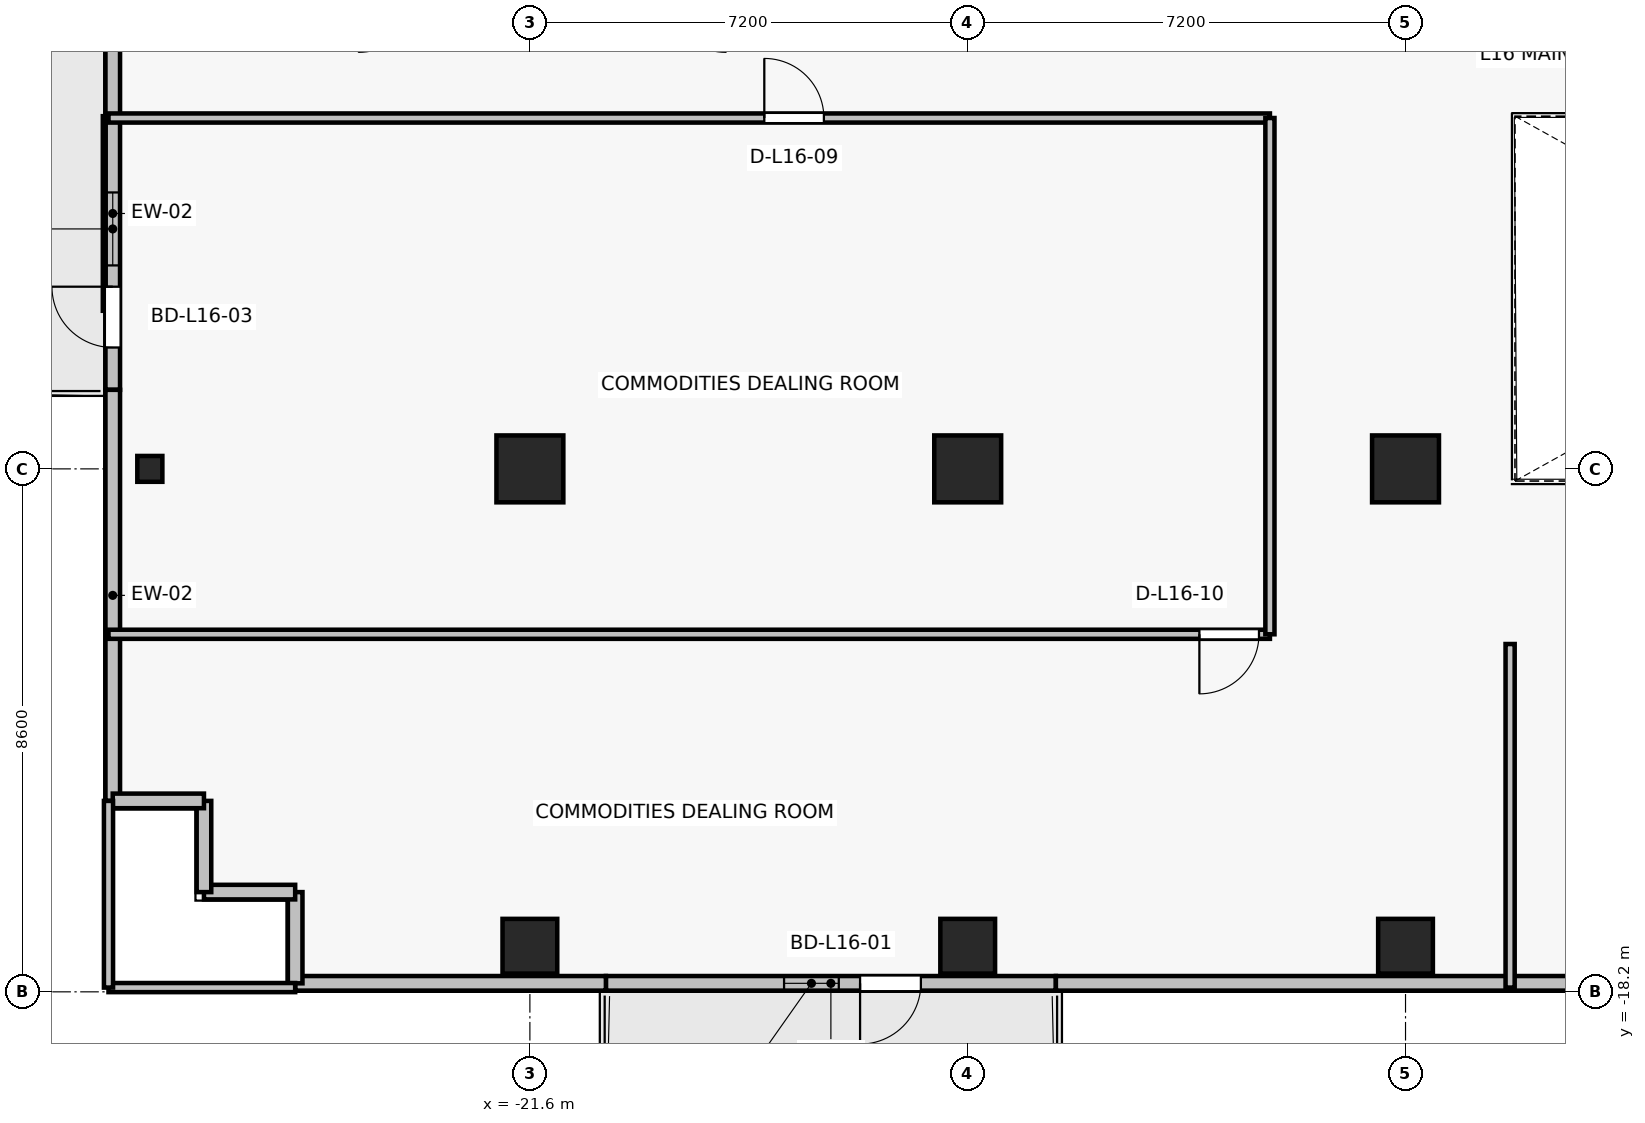
"""IFC4 building model, lengths in metres.
Left out: names, types, materials, properties, quantities, classifications, styles, units other than length and angle.
Written with IfcOpenShell. Run it as: python <this file> out.ifc"""

import sys

from ifc_helpers import new_model, si_unit, direction, frame, frame_2d, origin, origin_2d, place, context, subcontext, project, spatial, rectangle, i_section, extrude, source, transform, mapped, element, fill, save


model = new_model("IFC4")
c1 = context("Model", 3, precision=1e-05, world=origin(), true_north=direction((0.0, 1.0)))
c2 = subcontext(c1, "Body", "Model", "MODEL_VIEW")
j1 = project(units=[si_unit("LENGTHUNIT", "METRE"), si_unit("PLANEANGLEUNIT", "RADIAN")], contexts=[c1])
p1 = place(None, origin())
s1 = spatial("IfcSite", under=j1, at=p1, CompositionType="ELEMENT")
p2 = place(p1, origin())
s2 = spatial("IfcBuilding", under=s1, at=p2, CompositionType="ELEMENT")
p3 = place(p2, frame((0.0, 0.0, 60.4)))
s3 = spatial("IfcBuildingStorey", under=s2, at=p3, CompositionType="ELEMENT", Elevation=60.4)
for number, where, z_axis, x_axis in (
    (1, (-14.4, -9.6, 0.0), (0.0, 0.0, 1.0), (1.0, 0.0, 0.0)),
    (2, (-7.2, -9.6, 0.0), (0.0, 0.0, 1.0), (1.0, 0.0, 0.0)),
    (3, (-21.6, -9.6, 0.0), (0.0, 0.0, 1.0), (1.0, 0.0, 0.0)),
):
    element("IfcColumn", number, at=place(p3, frame(where, z_axis=z_axis, x_axis=x_axis)), inside=s3, PredefinedType="COLUMN", context=c2, shape_type="SweptSolid", body=[
        extrude(rectangle(XDim=1.1, YDim=1.1, at=origin_2d()), origin(), (0.0, 0.0, 1.0), 3.3),
    ])
for number, where, z_axis, x_axis in (
    (4, (-14.4, -17.45, 0.0), (0.0, 0.0, 1.0), (1.0, 0.0, 0.0)),
    (5, (-7.2, -17.45, 0.0), (0.0, 0.0, 1.0), (1.0, 0.0, 0.0)),
    (6, (-21.6, -17.45, 0.0), (0.0, 0.0, 1.0), (1.0, 0.0, 0.0)),
):
    element("IfcColumn", number, at=place(p3, frame(where, z_axis=z_axis, x_axis=x_axis)), inside=s3, PredefinedType="COLUMN", context=c2, shape_type="SweptSolid", body=[
        extrude(rectangle(XDim=0.9, YDim=0.9, at=origin_2d()), origin(), (0.0, 0.0, 1.0), 3.3),
    ])
p4 = place(p3, frame((-27.85, -9.6, 0.0), z_axis=(0.0, 0.0, 1.0), x_axis=(1.0, 0.0, 0.0)))
e7 = element("IfcColumn", 7, at=p4, inside=s3, PredefinedType="COLUMN", context=c2, shape_type="SweptSolid", body=[
    extrude(i_section(OverallWidth=0.412, OverallDepth=0.425, WebThickness=0.026, FlangeThickness=0.039, FilletRadius=0.015, at=origin_2d()), origin(), (0.0, 0.0, 1.0), 3.3),
])
p5 = place(p3, frame((-12.95, -18.06, 0.0), z_axis=(0.0, 0.0, 1.0), x_axis=(-1.0, 0.0, 0.0)))
e8 = element("IfcWall", 8, at=p5, inside=s3, PredefinedType="SOLIDWALL", context=c2, shape_type="SweptSolid", body=[
    extrude(rectangle(XDim=7.4, YDim=0.24, at=frame_2d((3.7, 0.0))), origin(), (0.0, 0.0, 1.0), 2.665),
])
p6 = place(p5, frame((2.22, 0.0, 0.0)))
e9 = element("IfcOpeningElement", 9, at=p6, cuts=e8, PredefinedType="OPENING", context=c2, shape_type="SweptSolid", body=[
    extrude(rectangle(XDim=1.0, YDim=2.2, at=frame_2d((0.5, 1.1))), frame((0.0, 0.13, 0.0), z_axis=(0.0, -1.0, 0.0), x_axis=(1.0, 0.0, 0.0)), (0.0, 0.0, 1.0), 0.26),
])
p7 = place(p5, frame((3.57, 0.0, 0.85)))
e10 = element("IfcOpeningElement", 10, at=p7, cuts=e8, PredefinedType="OPENING", context=c2, shape_type="SweptSolid", body=[
    extrude(rectangle(XDim=0.9, YDim=1.35, at=frame_2d((0.45, 0.675))), frame((0.0, 0.13, 0.0), z_axis=(0.0, -1.0, 0.0), x_axis=(1.0, 0.0, 0.0)), (0.0, 0.0, 1.0), 0.26),
])
p8 = place(p3, frame((-28.46, -8.3, 0.0), z_axis=(0.0, 0.0, 1.0), x_axis=(0.0, 1.0, 0.0)))
e11 = element("IfcWall", 11, at=p8, inside=s3, PredefinedType="SOLIDWALL", context=c2, shape_type="SweptSolid", body=[
    extrude(rectangle(XDim=5.8, YDim=0.24, at=frame_2d((2.9, 0.0))), origin(), (0.0, 0.0, 1.0), 3.075),
])
p9 = place(p8, frame((0.696, 0.0, 0.0)))
e12 = element("IfcOpeningElement", 12, at=p9, cuts=e11, PredefinedType="OPENING", context=c2, shape_type="SweptSolid", body=[
    extrude(rectangle(XDim=1.0, YDim=2.2, at=frame_2d((0.5, 1.1))), frame((0.0, 0.13, 0.0), z_axis=(0.0, -1.0, 0.0), x_axis=(1.0, 0.0, 0.0)), (0.0, 0.0, 1.0), 0.26),
])
p10 = place(p8, frame((2.046, 0.0, 0.85)))
e13 = element("IfcOpeningElement", 13, at=p10, cuts=e11, PredefinedType="OPENING", context=c2, shape_type="SweptSolid", body=[
    extrude(rectangle(XDim=1.2, YDim=1.5, at=frame_2d((0.6, 0.75))), frame((0.0, 0.13, 0.0), z_axis=(0.0, -1.0, 0.0), x_axis=(1.0, 0.0, 0.0)), (0.0, 0.0, 1.0), 0.26),
])
p11 = place(p3, frame((-28.46, -8.3, 0.0), z_axis=(0.0, 0.0, 1.0), x_axis=(0.0, -1.0, 0.0)))
e14 = element("IfcWall", 14, at=p11, inside=s3, PredefinedType="SOLIDWALL", context=c2, shape_type="SweptSolid", body=[
    extrude(rectangle(XDim=6.76, YDim=0.24, at=frame_2d((3.38, 0.0))), origin(), (0.0, 0.0, 1.0), 3.075),
])
p12 = place(p3, frame((-12.95, -18.06, 0.0), z_axis=(0.0, 0.0, 1.0), x_axis=(1.0, 0.0, 0.0)))
e15 = element("IfcWall", 15, at=p12, inside=s3, PredefinedType="SOLIDWALL", context=c2, shape_type="SweptSolid", body=[
    extrude(rectangle(XDim=9.61, YDim=0.24, at=frame_2d((4.805, 0.0))), origin(), (0.0, 0.0, 1.0), 2.665),
])
p13 = place(p3, frame((-25.46, -18.06, 0.0), z_axis=(0.0, 0.0, 1.0), x_axis=(1.0, 0.0, 0.0)))
e16 = element("IfcWall", 16, at=p13, inside=s3, PredefinedType="SOLIDWALL", context=c2, shape_type="SweptSolid", body=[
    extrude(rectangle(XDim=5.11, YDim=0.24, at=frame_2d((2.555, 0.0))), origin(), (0.0, 0.0, 1.0), 3.075),
])
for number, where, z_axis, x_axis in (
    (17, (-25.46, -16.56, 0.0), (0.0, 0.0, 1.0), (0.0, -1.0, 0.0)),
    (18, (-26.96, -16.56, 0.0), (0.0, 0.0, 1.0), (1.0, 0.0, 0.0)),
    (19, (-26.96, -15.06, 0.0), (0.0, 0.0, 1.0), (0.0, -1.0, 0.0)),
    (20, (-28.46, -15.06, 0.0), (0.0, 0.0, 1.0), (1.0, 0.0, 0.0)),
):
    element("IfcWall", number, at=place(p3, frame(where, z_axis=z_axis, x_axis=x_axis)), inside=s3, PredefinedType="SOLIDWALL", context=c2, shape_type="SweptSolid", body=[
        extrude(rectangle(XDim=1.5, YDim=0.24, at=frame_2d((0.75, 0.0))), origin(), (0.0, 0.0, 1.0), 3.075),
    ])
p14 = place(p3, frame((-9.43, -12.32, 0.0), z_axis=(0.0, 0.0, 1.0), x_axis=(-1.0, 0.0, 0.0)))
e21 = element("IfcWall", 21, at=p14, inside=s3, PredefinedType="PARTITIONING", context=c2, shape_type="SweptSolid", body=[
    extrude(rectangle(XDim=19.1, YDim=0.15, at=frame_2d((9.55, 0.0))), origin(), (0.0, 0.0, 1.0), 2.465),
])
p15 = place(p14, frame((0.18, 0.0, 0.0)))
e22 = element("IfcOpeningElement", 22, at=p15, cuts=e21, PredefinedType="OPENING", context=c2, shape_type="SweptSolid", body=[
    extrude(rectangle(XDim=0.98, YDim=2.15, at=frame_2d((0.49, 1.075))), frame((0.0, 0.085, 0.0), z_axis=(0.0, -1.0, 0.0), x_axis=(1.0, 0.0, 0.0)), (0.0, 0.0, 1.0), 0.17),
])
p16 = place(p3, frame((-28.53, -3.83, 0.0), z_axis=(0.0, 0.0, 1.0), x_axis=(1.0, 0.0, 0.0)))
e23 = element("IfcWall", 23, at=p16, inside=s3, PredefinedType="PARTITIONING", context=c2, shape_type="SweptSolid", body=[
    extrude(rectangle(XDim=19.1, YDim=0.15, at=frame_2d((9.55, 0.0))), origin(), (0.0, 0.0, 1.0), 2.465),
])
p17 = place(p16, frame((10.785, 0.0, 0.0)))
e24 = element("IfcOpeningElement", 24, at=p17, cuts=e23, PredefinedType="OPENING", context=c2, shape_type="SweptSolid", body=[
    extrude(rectangle(XDim=0.98, YDim=2.15, at=frame_2d((0.49, 1.075))), frame((0.0, 0.085, 0.0), z_axis=(0.0, -1.0, 0.0), x_axis=(1.0, 0.0, 0.0)), (0.0, 0.0, 1.0), 0.17),
])
p18 = place(p3, frame((-9.43, -3.83, 0.0), z_axis=(0.0, 0.0, 1.0), x_axis=(0.0, -1.0, 0.0)))
e25 = element("IfcWall", 25, at=p18, inside=s3, PredefinedType="PARTITIONING", context=c2, shape_type="SweptSolid", body=[
    extrude(rectangle(XDim=8.49, YDim=0.15, at=frame_2d((4.245, 0.0))), origin(), (0.0, 0.0, 1.0), 2.465),
])
p19 = place(p3, frame((-25.46, -18.13, 0.0), z_axis=(0.0, 0.0, 1.0), x_axis=(-1.0, 0.0, 0.0)))
e26 = element("IfcWall", 26, at=p19, inside=s3, PredefinedType="PARTITIONING", context=c2, shape_type="SweptSolid", body=[
    extrude(rectangle(XDim=3.07, YDim=0.15, at=frame_2d((1.535, 0.0))), origin(), (0.0, 0.0, 1.0), 2.665),
])
p20 = place(p3, frame((-28.53, -18.13, 0.0), z_axis=(0.0, 0.0, 1.0), x_axis=(0.0, 1.0, 0.0)))
e27 = element("IfcWall", 27, at=p20, inside=s3, PredefinedType="PARTITIONING", context=c2, shape_type="SweptSolid", body=[
    extrude(rectangle(XDim=3.07, YDim=0.15, at=frame_2d((1.535, 0.0))), origin(), (0.0, 0.0, 1.0), 3.075),
])
p21 = place(p3, frame((-5.48, -12.48, 0.0), z_axis=(0.0, 0.0, 1.0), x_axis=(0.0, -1.0, 0.0)))
e28 = element("IfcWall", 28, at=p21, inside=s3, PredefinedType="PARTITIONING", context=c2, shape_type="SweptSolid", body=[
    extrude(rectangle(XDim=5.65, YDim=0.15, at=frame_2d((2.825, 0.0))), origin(), (0.0, 0.0, 1.0), 2.465),
])
m1 = source(origin(), c2, "Body", "SweptSolid", [
    extrude(rectangle(XDim=1.0, YDim=2.2, at=frame_2d((0.5, 1.1))), frame((0.0, 0.025, 0.0), z_axis=(0.0, -1.0, 0.0), x_axis=(1.0, 0.0, 0.0)), (0.0, 0.0, 1.0), 0.05),
])
p22 = place(p6, origin())
e29 = element("IfcDoor", 29, at=p22, inside=s3, OperationType="SINGLE_SWING_RIGHT", PredefinedType="DOOR", context=c2, shape_type="MappedRepresentation", body=[
    mapped(m1, transform((0.0, 0.0, 0.0), x_axis=(1.0, 0.0, 0.0), y_axis=(0.0, 1.0, 0.0), z_axis=(0.0, 0.0, 1.0), scale=1.0)),
])
fill(e9, e29)
m2 = source(origin(), c2, "Body", "SweptSolid", [
    extrude(rectangle(XDim=0.9, YDim=1.35, at=frame_2d((0.45, 0.675))), frame((0.0, 0.03, 0.0), z_axis=(0.0, -1.0, 0.0), x_axis=(1.0, 0.0, 0.0)), (0.0, 0.0, 1.0), 0.06),
])
p23 = place(p7, origin())
e30 = element("IfcWindow", 30, at=p23, inside=s3, PartitioningType="SINGLE_PANEL", PredefinedType="WINDOW", context=c2, shape_type="MappedRepresentation", body=[
    mapped(m2, transform((0.0, 0.0, 0.0), x_axis=(1.0, 0.0, 0.0), y_axis=(0.0, 1.0, 0.0), z_axis=(0.0, 0.0, 1.0), scale=1.0)),
])
fill(e10, e30)
p24 = place(p9, origin())
e31 = element("IfcDoor", 31, at=p24, inside=s3, OperationType="SINGLE_SWING_RIGHT", PredefinedType="DOOR", context=c2, shape_type="MappedRepresentation", body=[
    mapped(m1, transform((0.0, 0.0, 0.0), x_axis=(1.0, 0.0, 0.0), y_axis=(0.0, 1.0, 0.0), z_axis=(0.0, 0.0, 1.0), scale=1.0)),
])
fill(e12, e31)
m3 = source(origin(), c2, "Body", "SweptSolid", [
    extrude(rectangle(XDim=1.2, YDim=1.5, at=frame_2d((0.6, 0.75))), frame((0.0, 0.03, 0.0), z_axis=(0.0, -1.0, 0.0), x_axis=(1.0, 0.0, 0.0)), (0.0, 0.0, 1.0), 0.06),
])
p25 = place(p10, origin())
e32 = element("IfcWindow", 32, at=p25, inside=s3, PartitioningType="SINGLE_PANEL", PredefinedType="WINDOW", context=c2, shape_type="MappedRepresentation", body=[
    mapped(m3, transform((0.0, 0.0, 0.0), x_axis=(1.0, 0.0, 0.0), y_axis=(0.0, 1.0, 0.0), z_axis=(0.0, 0.0, 1.0), scale=1.0)),
])
fill(e13, e32)
m4 = source(origin(), c2, "Body", "SweptSolid", [
    extrude(rectangle(XDim=0.98, YDim=2.15, at=frame_2d((0.49, 1.075))), frame((0.0, 0.025, 0.0), z_axis=(0.0, -1.0, 0.0), x_axis=(1.0, 0.0, 0.0)), (0.0, 0.0, 1.0), 0.05),
])
p26 = place(p17, origin())
e33 = element("IfcDoor", 33, at=p26, inside=s3, OperationType="SINGLE_SWING_LEFT", PredefinedType="DOOR", context=c2, shape_type="MappedRepresentation", body=[
    mapped(m4, transform((0.0, 0.0, 0.0), x_axis=(1.0, 0.0, 0.0), y_axis=(0.0, 1.0, 0.0), z_axis=(0.0, 0.0, 1.0), scale=1.0)),
])
fill(e24, e33)
p27 = place(p15, origin())
e34 = element("IfcDoor", 34, at=p27, inside=s3, OperationType="SINGLE_SWING_RIGHT", PredefinedType="DOOR", context=c2, shape_type="MappedRepresentation", body=[
    mapped(m4, transform((0.0, 0.0, 0.0), x_axis=(1.0, 0.0, 0.0), y_axis=(0.0, 1.0, 0.0), z_axis=(0.0, 0.0, 1.0), scale=1.0)),
])
fill(e22, e34)
save(model, sys.argv[1])
